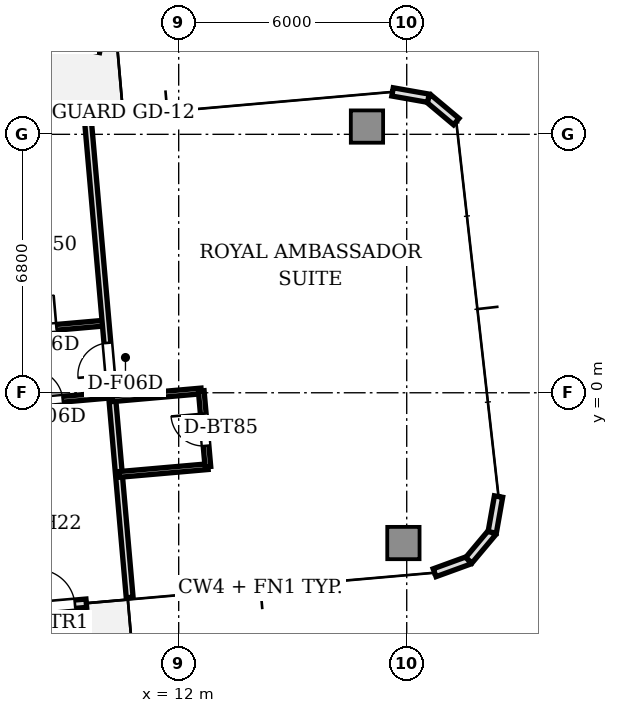
"""IFC4 building model, lengths in metres.
Left out: names, types, materials, properties, quantities, classifications, styles, units other than length and angle.
Written with IfcOpenShell. Run it as: python <this file> out.ifc"""

import sys

from ifc_helpers import new_model, si_unit, direction, frame, frame_2d, origin, origin_2d, place, context, subcontext, project, spatial, rectangle, extrude, source, transform, mapped, element, fill, save


model = new_model("IFC4")
c1 = context("Model", 3, precision=1e-05, world=origin(), true_north=direction((0.0, 1.0)))
c2 = subcontext(c1, "Body", "Model", "MODEL_VIEW")
j1 = project(units=[si_unit("LENGTHUNIT", "METRE"), si_unit("PLANEANGLEUNIT", "RADIAN")], contexts=[c1])
p1 = place(None, origin())
s1 = spatial("IfcSite", under=j1, at=p1, CompositionType="ELEMENT")
p2 = place(p1, origin())
s2 = spatial("IfcBuilding", under=s1, at=p2, CompositionType="ELEMENT")
p3 = place(p2, frame((0.0, 0.0, 195.3)))
s3 = spatial("IfcBuildingStorey", under=s2, at=p3, CompositionType="ELEMENT", Elevation=195.3)
m1 = source(origin(), c2, "Body", "SweptSolid", [
    extrude(rectangle(XDim=0.85, YDim=0.85, at=origin_2d()), origin(), (0.0, 0.0, 1.0), 3.11),
])
for number, where, z_axis, x_axis in (
    (1, (17.913, -3.954, 0.0), (0.0, 0.0, 1.0), (1.0, 0.0, 0.0)),
    (2, (16.954, 7.004, 0.0), (0.0, 0.0, 1.0), (1.0, 0.0, 0.0)),
):
    element("IfcColumn", number, at=place(p3, frame(where, z_axis=z_axis, x_axis=x_axis)), inside=s3, PredefinedType="COLUMN", context=c2, shape_type="MappedRepresentation", body=[
        mapped(m1, transform((0.0, 0.0, 0.0), scale=1.0)),
    ])
p4 = place(p3, frame((6.879, -5.772, 0.0), z_axis=(0.0, 0.0, 1.0), x_axis=(0.996193619346, 0.087168071984, 0.0)))
e3 = element("IfcWall", 3, at=p4, inside=s3, PredefinedType="STANDARD", context=c2, shape_type="SweptSolid", body=[
    extrude(rectangle(XDim=2.7, YDim=0.22, at=frame_2d((1.35, 0.0))), origin(), (0.0, 0.0, 1.0), 3.11),
])
p5 = place(p4, frame((1.4, 0.0, 0.0)))
e4 = element("IfcOpeningElement", 4, at=p5, cuts=e3, PredefinedType="OPENING", context=c2, shape_type="SweptSolid", body=[
    extrude(rectangle(XDim=1.0, YDim=2.2, at=frame_2d((0.5, 1.1))), frame((0.0, 0.12, 0.0), z_axis=(0.0, -1.0, 0.0), x_axis=(1.0, 0.0, 0.0)), (0.0, 0.0, 1.0), 0.24),
])
p6 = place(p3, frame((18.734, -4.735, 0.0), z_axis=(0.0, 0.0, 1.0), x_axis=(0.939741306239, 0.34188635151, 0.0)))
e5 = element("IfcWall", 5, at=p6, inside=s3, PredefinedType="STANDARD", context=c2, shape_type="SweptSolid", body=[
    extrude(rectangle(XDim=0.958, YDim=0.22, at=frame_2d((0.479, 0.0))), origin(), (0.0, 0.0, 1.0), 3.11),
])
for number, where, z_axis, x_axis in (
    (6, (19.634, -4.408, 0.0), (0.0, 0.0, 1.0), (0.643, 0.766, 0.0)),
    (7, (20.25, -3.674, 0.0), (0.0, 0.0, 1.0), (0.174, 0.985, 0.0)),
):
    element("IfcWall", number, at=place(p3, frame(where, z_axis=z_axis, x_axis=x_axis)), inside=s3, PredefinedType="STANDARD", context=c2, shape_type="SweptSolid", body=[
        extrude(rectangle(XDim=0.958, YDim=0.22, at=frame_2d((0.479, 0.0))), origin(), (0.0, 0.0, 1.0), 3.11),
    ])
p7 = place(p3, frame((19.304, 7.135, 0.0), z_axis=(0.0, 0.0, 1.0), x_axis=(-0.766001159887, 0.642839189107, 0.0)))
e8 = element("IfcWall", 8, at=p7, inside=s3, PredefinedType="STANDARD", context=c2, shape_type="SweptSolid", body=[
    extrude(rectangle(XDim=0.958, YDim=0.22, at=frame_2d((0.479, 0.0))), origin(), (0.0, 0.0, 1.0), 3.11),
])
p8 = place(p3, frame((18.57, 7.75, 0.0), z_axis=(0.0, 0.0, 1.0), x_axis=(-0.984770724397, 0.173858046606, 0.0)))
e9 = element("IfcWall", 9, at=p8, inside=s3, PredefinedType="STANDARD", context=c2, shape_type="SweptSolid", body=[
    extrude(rectangle(XDim=0.958, YDim=0.22, at=frame_2d((0.479, 0.0))), origin(), (0.0, 0.0, 1.0), 3.11),
])
p9 = place(p3, frame((9.938, 9.049, 0.0), z_axis=(0.0, 0.0, 1.0), x_axis=(-0.980636950017, 0.195834553288, 0.0)))
e10 = element("IfcWall", 10, at=p9, inside=s3, PredefinedType="PARAPET", context=c2, shape_type="SweptSolid", body=[
    extrude(rectangle(XDim=2.001, YDim=0.2, at=frame_2d((1.0, 0.0))), origin(), (0.0, 0.0, 1.0), 0.65),
])
p10 = place(p3, frame((6.741, 1.543, 0.0), z_axis=(0.0, 0.0, 1.0), x_axis=(0.996193954812, 0.087164238054, 0.0)))
e11 = element("IfcWall", 11, at=p10, inside=s3, PredefinedType="PARTITIONING", context=c2, shape_type="SweptSolid", body=[
    extrude(rectangle(XDim=3.35, YDim=0.15, at=frame_2d((1.675, 0.0))), origin(), (0.0, 0.0, 1.0), 2.66),
])
p11 = place(p10, frame((1.2, 0.0, 0.0)))
e12 = element("IfcOpeningElement", 12, at=p11, cuts=e11, PredefinedType="OPENING", context=c2, shape_type="SweptSolid", body=[
    extrude(rectangle(XDim=0.85, YDim=2.1, at=frame_2d((0.425, 1.05))), frame((0.0, 0.085, 0.0), z_axis=(0.0, -1.0, 0.0), x_axis=(1.0, 0.0, 0.0)), (0.0, 0.0, 1.0), 0.17),
])
p12 = place(p3, frame((6.907, -0.349, 0.0), z_axis=(0.0, 0.0, 1.0), x_axis=(0.996193954812, 0.087164238054, 0.0)))
e13 = element("IfcWall", 13, at=p12, inside=s3, PredefinedType="PARTITIONING", context=c2, shape_type="SweptSolid", body=[
    extrude(rectangle(XDim=3.35, YDim=0.15, at=frame_2d((1.675, 0.0))), origin(), (0.0, 0.0, 1.0), 2.66),
])
p13 = place(p12, frame((1.2, 0.0, 0.0)))
e14 = element("IfcOpeningElement", 14, at=p13, cuts=e13, PredefinedType="OPENING", context=c2, shape_type="SweptSolid", body=[
    extrude(rectangle(XDim=0.85, YDim=2.1, at=frame_2d((0.425, 1.05))), frame((0.0, 0.085, 0.0), z_axis=(0.0, -1.0, 0.0), x_axis=(1.0, 0.0, 0.0)), (0.0, 0.0, 1.0), 0.17),
])
p14 = place(p3, frame((10.71, -5.387, 0.0), z_axis=(0.0, 0.0, 1.0), x_axis=(-0.087154691724, 0.996194790044, 0.0)))
e15 = element("IfcWall", 15, at=p14, inside=s3, PredefinedType="PARTITIONING", context=c2, shape_type="SweptSolid", body=[
    extrude(rectangle(XDim=12.6, YDim=0.18, at=frame_2d((6.3, 0.0))), origin(), (0.0, 0.0, 1.0), 2.66),
])
p15 = place(p14, frame((5.875, 0.0, 0.0)))
e16 = element("IfcOpeningElement", 16, at=p15, cuts=e15, PredefinedType="OPENING", context=c2, shape_type="SweptSolid", body=[
    extrude(rectangle(XDim=0.85, YDim=2.1, at=frame_2d((0.425, 1.05))), frame((0.0, 0.1, 0.0), z_axis=(0.0, -1.0, 0.0), x_axis=(1.0, 0.0, 0.0)), (0.0, 0.0, 1.0), 0.2),
])
for number, where, z_axis, x_axis in (
    (17, (10.253, -0.157, 0.0), (0.0, 0.0, 1.0), (0.996, 0.087, 0.0)),
    (18, (10.427, -2.149, 0.0), (0.0, 0.0, 1.0), (0.996, 0.087, 0.0)),
):
    element("IfcWall", number, at=place(p3, frame(where, z_axis=z_axis, x_axis=x_axis)), inside=s3, PredefinedType="PARTITIONING", context=c2, shape_type="SweptSolid", body=[
        extrude(rectangle(XDim=2.35, YDim=0.15, at=frame_2d((1.175, 0.0))), origin(), (0.0, 0.0, 1.0), 2.66),
    ])
p16 = place(p3, frame((12.768, -1.945, 0.0), z_axis=(0.0, 0.0, 1.0), x_axis=(-0.087156350505, 0.99619464492, 0.0)))
e19 = element("IfcWall", 19, at=p16, inside=s3, PredefinedType="PARTITIONING", context=c2, shape_type="SweptSolid", body=[
    extrude(rectangle(XDim=2.0, YDim=0.15, at=frame_2d((1.0, 0.0))), origin(), (0.0, 0.0, 1.0), 2.66),
])
p17 = place(p16, frame((0.55, 0.0, 0.0)))
e20 = element("IfcOpeningElement", 20, at=p17, cuts=e19, PredefinedType="OPENING", context=c2, shape_type="SweptSolid", body=[
    extrude(rectangle(XDim=0.85, YDim=2.1, at=frame_2d((0.425, 1.05))), frame((0.0, 0.085, 0.0), z_axis=(0.0, -1.0, 0.0), x_axis=(1.0, 0.0, 0.0)), (0.0, 0.0, 1.0), 0.17),
])
m2 = source(origin(), c2, "Body", "SweptSolid", [
    extrude(rectangle(XDim=1.0, YDim=0.05, at=origin_2d()), origin(), (0.0, 0.0, 1.0), 2.2),
])
p18 = place(p5, frame((0.5, 0.0, 0.0)))
e21 = element("IfcDoor", 21, at=p18, inside=s3, OperationType="SINGLE_SWING_LEFT", PredefinedType="DOOR", context=c2, shape_type="MappedRepresentation", body=[
    mapped(m2, transform((0.0, 0.0, 0.0), scale=1.0)),
])
fill(e4, e21)
m3 = source(origin(), c2, "Body", "SweptSolid", [
    extrude(rectangle(XDim=0.85, YDim=0.05, at=origin_2d()), origin(), (0.0, 0.0, 1.0), 2.1),
])
p19 = place(p11, frame((0.425, 0.0, 0.0)))
e22 = element("IfcDoor", 22, at=p19, inside=s3, OperationType="SINGLE_SWING_RIGHT", PredefinedType="DOOR", context=c2, shape_type="MappedRepresentation", body=[
    mapped(m3, transform((0.0, 0.0, 0.0), scale=1.0)),
])
fill(e12, e22)
p20 = place(p13, frame((0.425, 0.0, 0.0)))
e23 = element("IfcDoor", 23, at=p20, inside=s3, OperationType="SINGLE_SWING_LEFT", PredefinedType="DOOR", context=c2, shape_type="MappedRepresentation", body=[
    mapped(m3, transform((0.0, 0.0, 0.0), scale=1.0)),
])
fill(e14, e23)
p21 = place(p17, frame((0.425, 0.0, 0.0)))
e24 = element("IfcDoor", 24, at=p21, inside=s3, OperationType="SINGLE_SWING_RIGHT", PredefinedType="DOOR", context=c2, shape_type="MappedRepresentation", body=[
    mapped(m3, transform((0.0, 0.0, 0.0), scale=1.0)),
])
fill(e20, e24)
p22 = place(p15, frame((0.425, 0.0, 0.0)))
e25 = element("IfcDoor", 25, at=p22, inside=s3, OperationType="SINGLE_SWING_LEFT", PredefinedType="DOOR", context=c2, shape_type="MappedRepresentation", body=[
    mapped(m3, transform((0.0, 0.0, 0.0), scale=1.0)),
])
fill(e16, e25)
save(model, sys.argv[1])
